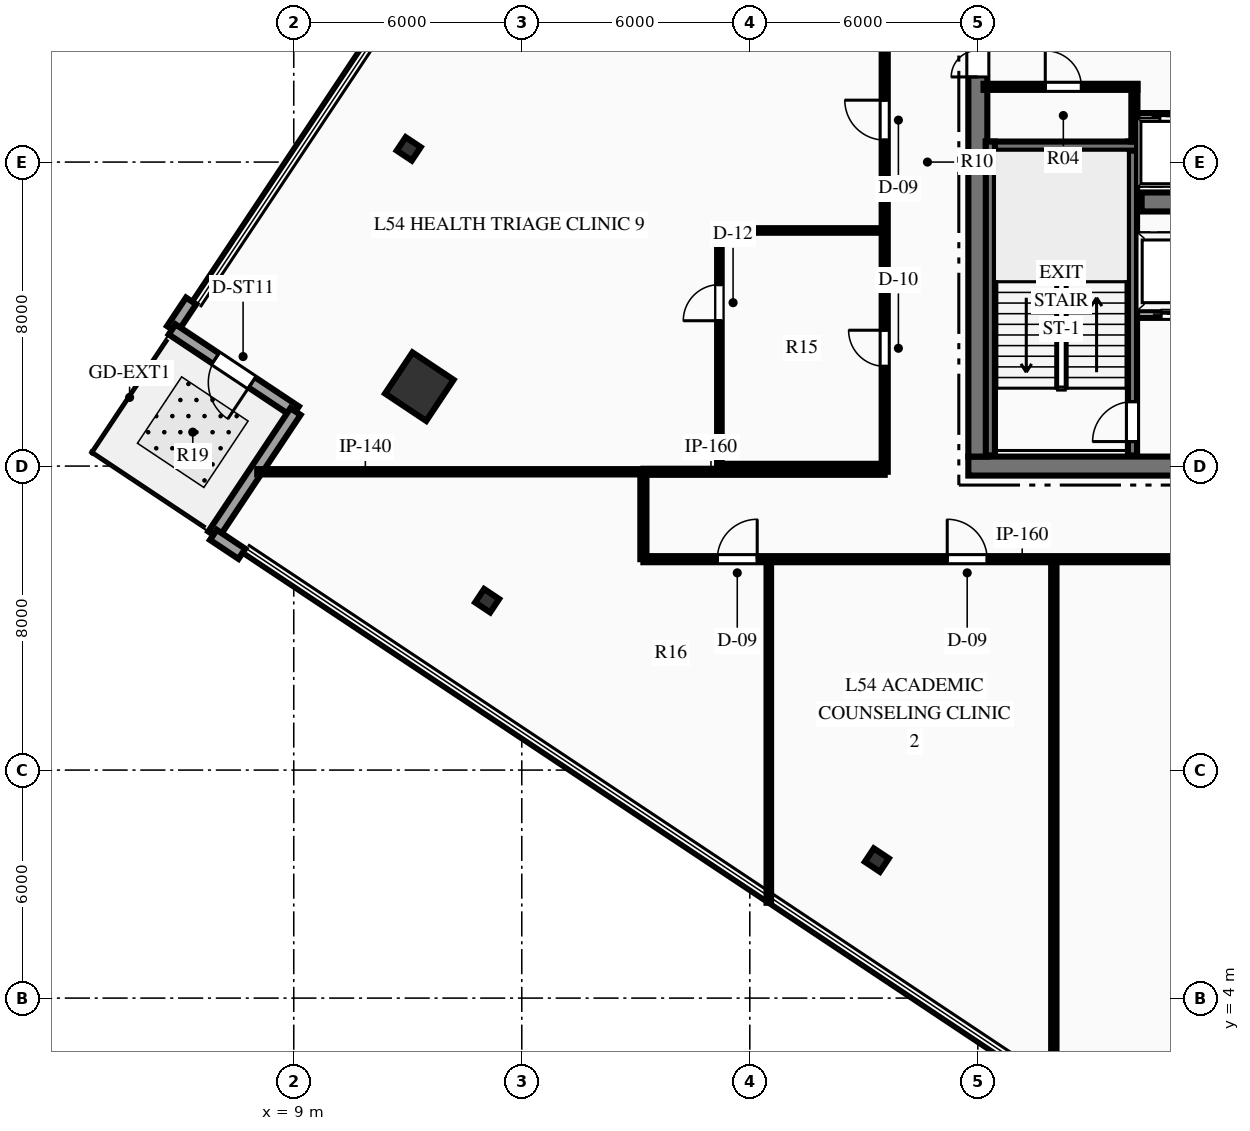
"""IFC4 building model, lengths in metres.
Left out: names, types, materials, properties, quantities, classifications, styles, units other than length and angle.
Written with IfcOpenShell. Run it as: python <this file> out.ifc"""

import sys

from ifc_helpers import new_model, si_unit, direction, frame, frame_2d, origin, origin_2d, place, context, subcontext, project, spatial, rectangle, hollow_rectangle, i_section, extrude, element, fill, save


model = new_model("IFC4")
c1 = context("Model", 3, precision=1e-05, world=origin(), true_north=direction((0.0, 1.0)))
c2 = subcontext(c1, "Body", "Model", "MODEL_VIEW")
j1 = project(units=[si_unit("LENGTHUNIT", "METRE"), si_unit("PLANEANGLEUNIT", "RADIAN")], contexts=[c1])
p1 = place(None, origin())
s1 = spatial("IfcSite", under=j1, at=p1, CompositionType="ELEMENT")
p2 = place(p1, origin())
s2 = spatial("IfcBuilding", under=s1, at=p2, CompositionType="ELEMENT")
p3 = place(p2, frame((0.0, 0.0, 217.2)))
s3 = spatial("IfcBuildingStorey", under=s2, at=p3, CompositionType="ELEMENT", Elevation=217.2)
p4 = place(p3, frame((26.75, 18.0, 0.0), z_axis=(0.0, 0.0, 1.0), x_axis=(1.0, 0.0, 0.0)))
e1 = element("IfcWall", 1, at=p4, inside=s3, PredefinedType="SHEAR", context=c2, shape_type="SweptSolid", body=[
    extrude(rectangle(XDim=18.5, YDim=0.5, at=frame_2d((9.25, 0.0))), origin(), (0.0, 0.0, 1.0), 3.75),
])
p5 = place(p4, frame((7.35, 0.0, 0.0)))
e2 = element("IfcOpeningElement", 2, at=p5, cuts=e1, PredefinedType="OPENING", context=c2, shape_type="SweptSolid", body=[
    extrude(rectangle(XDim=1.1, YDim=2.15, at=frame_2d((0.55, 1.075))), frame((0.0, 0.26, 0.0), z_axis=(0.0, -1.0, 0.0), x_axis=(1.0, 0.0, 0.0)), (0.0, 0.0, 1.0), 0.52),
])
p6 = place(p4, frame((10.05, 0.0, 0.0)))
e3 = element("IfcOpeningElement", 3, at=p6, cuts=e1, PredefinedType="OPENING", context=c2, shape_type="SweptSolid", body=[
    extrude(rectangle(XDim=1.1, YDim=2.15, at=frame_2d((0.55, 1.075))), frame((0.0, 0.26, 0.0), z_axis=(0.0, -1.0, 0.0), x_axis=(1.0, 0.0, 0.0)), (0.0, 0.0, 1.0), 0.52),
])
p7 = place(p3, frame((27.0, 18.25, 0.0), z_axis=(0.0, 0.0, 1.0), x_axis=(0.0, 1.0, 0.0)))
e4 = element("IfcWall", 4, at=p7, inside=s3, PredefinedType="SHEAR", context=c2, shape_type="SweptSolid", body=[
    extrude(rectangle(XDim=15.5, YDim=0.5, at=frame_2d((7.75, 0.0))), origin(), (0.0, 0.0, 1.0), 3.75),
])
p8 = place(p7, frame((9.99, 0.0, 0.0)))
e5 = element("IfcOpeningElement", 5, at=p8, cuts=e4, PredefinedType="OPENING", context=c2, shape_type="SweptSolid", body=[
    extrude(rectangle(XDim=1.4, YDim=2.2, at=frame_2d((0.7, 1.1))), frame((0.0, 0.26, 0.0), z_axis=(0.0, -1.0, 0.0), x_axis=(1.0, 0.0, 0.0)), (0.0, 0.0, 1.0), 0.52),
])
p9 = place(p3, frame((31.31, 24.95, 0.0), z_axis=(0.0, 0.0, 1.0), x_axis=(1.0, 0.0, 0.0)))
e6 = element("IfcWall", 6, at=p9, inside=s3, PredefinedType="SHEAR", context=c2, shape_type="SweptSolid", body=[
    extrude(rectangle(XDim=9.38, YDim=0.5, at=frame_2d((4.69, 0.0))), origin(), (0.0, 0.0, 1.0), 3.75),
])
p10 = place(p3, frame((31.07, 18.28, 0.0), z_axis=(0.0, 0.0, 1.0), x_axis=(0.0, 1.0, 0.0)))
e7 = element("IfcWall", 7, at=p10, inside=s3, PredefinedType="SHEAR", context=c2, shape_type="SweptSolid", body=[
    extrude(rectangle(XDim=8.26, YDim=0.24, at=frame_2d((4.13, 0.0))), origin(), (0.0, 0.0, 1.0), 3.75),
])
p11 = place(p10, frame((0.365, 0.0, 0.0)))
e8 = element("IfcOpeningElement", 8, at=p11, cuts=e7, PredefinedType="OPENING", context=c2, shape_type="SweptSolid", body=[
    extrude(rectangle(XDim=1.05, YDim=2.15, at=frame_2d((0.525, 1.075))), frame((0.0, 0.13, 0.0), z_axis=(0.0, -1.0, 0.0), x_axis=(1.0, 0.0, 0.0)), (0.0, 0.0, 1.0), 0.26),
])
p12 = place(p3, frame((27.21, 26.42, 0.0), z_axis=(0.0, 0.0, 1.0), x_axis=(1.0, 0.0, 0.0)))
e9 = element("IfcWall", 9, at=p12, inside=s3, PredefinedType="SHEAR", context=c2, shape_type="SweptSolid", body=[
    extrude(rectangle(XDim=3.98, YDim=0.24, at=frame_2d((1.99, 0.0))), origin(), (0.0, 0.0, 1.0), 3.75),
])
p13 = place(p3, frame((27.33, 18.28, 0.0), z_axis=(0.0, 0.0, 1.0), x_axis=(0.0, 1.0, 0.0)))
e10 = element("IfcWall", 10, at=p13, inside=s3, PredefinedType="SHEAR", context=c2, shape_type="SweptSolid", body=[
    extrude(rectangle(XDim=8.26, YDim=0.24, at=frame_2d((4.13, 0.0))), origin(), (0.0, 0.0, 1.0), 3.75),
])
p14 = place(p3, frame((12.305, 20.09, 0.0), z_axis=(0.0, 0.0, 1.0), x_axis=(0.554118199338, 0.832437998389, 0.0)))
e11 = element("IfcColumn", 11, at=p14, inside=s3, PredefinedType="COLUMN", context=c2, shape_type="SweptSolid", body=[
    extrude(hollow_rectangle(XDim=1.3, YDim=1.3, WallThickness=0.06, at=origin_2d()), origin(), (0.0, 0.0, 1.0), 3.75),
])
for number, where, z_axis, x_axis in (
    (12, (12.025, 26.347, 0.0), (0.0, 0.0, 1.0), (0.554, 0.832, 0.0)),
    (13, (14.088, 14.458, 0.0), (0.0, 0.0, 1.0), (0.554, 0.832, 0.0)),
    (14, (24.343, 7.631, 0.0), (0.0, 0.0, 1.0), (0.554, 0.832, 0.0)),
):
    element("IfcColumn", number, at=place(p3, frame(where, z_axis=z_axis, x_axis=x_axis)), inside=s3, PredefinedType="COLUMN", context=c2, shape_type="SweptSolid", body=[
        extrude(i_section(OverallWidth=0.424, OverallDepth=0.474, WebThickness=0.048, FlangeThickness=0.077, at=origin_2d()), origin(), (0.0, 0.0, 1.0), 3.75),
    ])
p15 = place(p3, frame((5.8, 21.597, 0.0), z_axis=(0.0, 0.0, 1.0), x_axis=(0.554136731172, 0.832425662246, 0.0)))
e15 = element("IfcWall", 15, at=p15, inside=s3, PredefinedType="STANDARD", context=c2, shape_type="SweptSolid", body=[
    extrude(rectangle(XDim=0.9, YDim=0.32, at=frame_2d((0.45, 0.0))), origin(), (0.0, 0.0, 1.0), 3.47),
])
p16 = place(p3, frame((9.046, 19.436, 0.0), z_axis=(0.0, 0.0, 1.0), x_axis=(-0.832464190202, 0.554078850013, 0.0)))
e16 = element("IfcWall", 16, at=p16, inside=s3, PredefinedType="STANDARD", context=c2, shape_type="SweptSolid", body=[
    extrude(rectangle(XDim=3.9, YDim=0.32, at=frame_2d((1.95, 0.0))), origin(), (0.0, 0.0, 1.0), 3.47),
])
p17 = place(p16, frame((1.375, 0.0, 0.0)))
e17 = element("IfcOpeningElement", 17, at=p17, cuts=e16, PredefinedType="OPENING", context=c2, shape_type="SweptSolid", body=[
    extrude(rectangle(XDim=1.15, YDim=2.2, at=frame_2d((0.575, 1.1))), frame((0.0, 0.17, 0.0), z_axis=(0.0, -1.0, 0.0), x_axis=(1.0, 0.0, 0.0)), (0.0, 0.0, 1.0), 0.34),
])
p18 = place(p3, frame((6.885, 16.189, 0.0), z_axis=(0.0, 0.0, 1.0), x_axis=(0.554122229834, 0.832435315447, 0.0)))
e18 = element("IfcWall", 18, at=p18, inside=s3, PredefinedType="STANDARD", context=c2, shape_type="SweptSolid", body=[
    extrude(rectangle(XDim=3.9, YDim=0.32, at=frame_2d((1.95, 0.0))), origin(), (0.0, 0.0, 1.0), 3.47),
])
p19 = place(p3, frame((7.634, 15.69, 0.0), z_axis=(0.0, 0.0, 1.0), x_axis=(-0.832425662246, 0.554136731172, 0.0)))
e19 = element("IfcWall", 19, at=p19, inside=s3, PredefinedType="STANDARD", context=c2, shape_type="SweptSolid", body=[
    extrude(rectangle(XDim=0.9, YDim=0.32, at=frame_2d((0.45, 0.0))), origin(), (0.0, 0.0, 1.0), 3.47),
])
p20 = place(p3, frame((31.19, 22.0, 0.0), z_axis=(0.0, 0.0, 1.0), x_axis=(1.0, 0.0, 0.0)))
e20 = element("IfcWall", 20, at=p20, inside=s3, PredefinedType="PARTITIONING", context=c2, shape_type="SweptSolid", body=[
    extrude(rectangle(XDim=4.69, YDim=0.2, at=frame_2d((2.345, 0.0))), origin(), (0.0, 0.0, 1.0), 3.47),
])
p21 = place(p20, frame((2.91, 0.0, 0.0)))
e21 = element("IfcOpeningElement", 21, at=p21, cuts=e20, PredefinedType="OPENING", context=c2, shape_type="SweptSolid", body=[
    extrude(rectangle(XDim=0.9, YDim=2.15, at=frame_2d((0.45, 1.075))), frame((0.0, 0.11, 0.0), z_axis=(0.0, -1.0, 0.0), x_axis=(1.0, 0.0, 0.0)), (0.0, 0.0, 1.0), 0.22),
])
p22 = place(p20, frame((0.635, 0.0, 0.0)))
e22 = element("IfcOpeningElement", 22, at=p22, cuts=e20, PredefinedType="OPENING", context=c2, shape_type="SweptSolid", body=[
    extrude(rectangle(XDim=1.1, YDim=2.15, at=frame_2d((0.55, 1.075))), frame((0.0, 0.11, 0.0), z_axis=(0.0, -1.0, 0.0), x_axis=(1.0, 0.0, 0.0)), (0.0, 0.0, 1.0), 0.22),
])
p23 = place(p3, frame((27.15, 27.98, 0.0), z_axis=(0.0, 0.0, 1.0), x_axis=(1.0, 0.0, 0.0)))
e23 = element("IfcWall", 23, at=p23, inside=s3, PredefinedType="PARTITIONING", context=c2, shape_type="SweptSolid", body=[
    extrude(rectangle(XDim=4.05, YDim=0.16, at=frame_2d((2.025, 0.0))), origin(), (0.0, 0.0, 1.0), 3.47),
])
p24 = place(p23, frame((1.625, 0.0, 0.0)))
e24 = element("IfcOpeningElement", 24, at=p24, cuts=e23, PredefinedType="OPENING", context=c2, shape_type="SweptSolid", body=[
    extrude(rectangle(XDim=0.95, YDim=2.15, at=frame_2d((0.475, 1.075))), frame((0.0, 0.09, 0.0), z_axis=(0.0, -1.0, 0.0), x_axis=(1.0, 0.0, 0.0)), (0.0, 0.0, 1.0), 0.18),
])
p25 = place(p3, frame((31.12, 26.54, 0.0), z_axis=(0.0, 0.0, 1.0), x_axis=(0.0, 1.0, 0.0)))
e25 = element("IfcWall", 25, at=p25, inside=s3, PredefinedType="PARTITIONING", context=c2, shape_type="SweptSolid", body=[
    extrude(rectangle(XDim=1.51, YDim=0.16, at=frame_2d((0.755, 0.0))), origin(), (0.0, 0.0, 1.0), 3.47),
])
p26 = place(p3, frame((31.2, 27.2, 0.0), z_axis=(0.0, 0.0, 1.0), x_axis=(1.0, 0.0, 0.0)))
e26 = element("IfcWall", 26, at=p26, inside=s3, PredefinedType="PARTITIONING", context=c2, shape_type="SweptSolid", body=[
    extrude(rectangle(XDim=9.6, YDim=0.18, at=frame_2d((4.8, 0.0))), origin(), (0.0, 0.0, 1.0), 3.47),
])
p27 = place(p26, frame((0.59, 0.0, 0.0)))
e27 = element("IfcOpeningElement", 27, at=p27, cuts=e26, PredefinedType="OPENING", context=c2, shape_type="SweptSolid", body=[
    extrude(rectangle(XDim=1.1, YDim=2.15, at=frame_2d((0.55, 1.075))), frame((0.0, 0.1, 0.0), z_axis=(0.0, -1.0, 0.0), x_axis=(1.0, 0.0, 0.0)), (0.0, 0.0, 1.0), 0.2),
])
p28 = place(p26, frame((2.99, 0.0, 0.0)))
e28 = element("IfcOpeningElement", 28, at=p28, cuts=e26, PredefinedType="OPENING", context=c2, shape_type="SweptSolid", body=[
    extrude(rectangle(XDim=1.1, YDim=2.15, at=frame_2d((0.55, 1.075))), frame((0.0, 0.1, 0.0), z_axis=(0.0, -1.0, 0.0), x_axis=(1.0, 0.0, 0.0)), (0.0, 0.0, 1.0), 0.2),
])
p29 = place(p26, frame((5.51, 0.0, 0.0)))
e29 = element("IfcOpeningElement", 29, at=p29, cuts=e26, PredefinedType="OPENING", context=c2, shape_type="SweptSolid", body=[
    extrude(rectangle(XDim=1.1, YDim=2.15, at=frame_2d((0.55, 1.075))), frame((0.0, 0.1, 0.0), z_axis=(0.0, -1.0, 0.0), x_axis=(1.0, 0.0, 0.0)), (0.0, 0.0, 1.0), 0.2),
])
p30 = place(p26, frame((7.91, 0.0, 0.0)))
e30 = element("IfcOpeningElement", 30, at=p30, cuts=e26, PredefinedType="OPENING", context=c2, shape_type="SweptSolid", body=[
    extrude(rectangle(XDim=1.1, YDim=2.15, at=frame_2d((0.55, 1.075))), frame((0.0, 0.1, 0.0), z_axis=(0.0, -1.0, 0.0), x_axis=(1.0, 0.0, 0.0)), (0.0, 0.0, 1.0), 0.2),
])
p31 = place(p3, frame((18.2, 15.55, 0.0), z_axis=(0.0, 0.0, 1.0), x_axis=(1.0, 0.0, 0.0)))
e31 = element("IfcWall", 31, at=p31, inside=s3, PredefinedType="PARTITIONING", context=c2, shape_type="SweptSolid", body=[
    extrude(rectangle(XDim=35.6, YDim=0.16, at=frame_2d((17.8, 0.0))), origin(), (0.0, 0.0, 1.0), 2.849),
])
p32 = place(p31, frame((22.45, 0.0, 0.0)))
e32 = element("IfcOpeningElement", 32, at=p32, cuts=e31, PredefinedType="OPENING", context=c2, shape_type="SweptSolid", body=[
    extrude(rectangle(XDim=0.9, YDim=2.15, at=frame_2d((0.45, 1.075))), frame((0.0, 0.09, 0.0), z_axis=(0.0, -1.0, 0.0), x_axis=(1.0, 0.0, 0.0)), (0.0, 0.0, 1.0), 0.18),
])
p33 = place(p31, frame((24.75, 0.0, 0.0)))
e33 = element("IfcOpeningElement", 33, at=p33, cuts=e31, PredefinedType="OPENING", context=c2, shape_type="SweptSolid", body=[
    extrude(rectangle(XDim=0.9, YDim=2.15, at=frame_2d((0.45, 1.075))), frame((0.0, 0.09, 0.0), z_axis=(0.0, -1.0, 0.0), x_axis=(1.0, 0.0, 0.0)), (0.0, 0.0, 1.0), 0.18),
])
p34 = place(p31, frame((27.0, 0.0, 0.0)))
e34 = element("IfcOpeningElement", 34, at=p34, cuts=e31, PredefinedType="OPENING", context=c2, shape_type="SweptSolid", body=[
    extrude(rectangle(XDim=1.0, YDim=2.15, at=frame_2d((0.5, 1.075))), frame((0.0, 0.09, 0.0), z_axis=(0.0, -1.0, 0.0), x_axis=(1.0, 0.0, 0.0)), (0.0, 0.0, 1.0), 0.18),
])
p35 = place(p31, frame((1.945, 0.0, 0.0)))
e35 = element("IfcOpeningElement", 35, at=p35, cuts=e31, PredefinedType="OPENING", context=c2, shape_type="SweptSolid", body=[
    extrude(rectangle(XDim=1.05, YDim=2.15, at=frame_2d((0.525, 1.075))), frame((0.0, 0.09, 0.0), z_axis=(0.0, -1.0, 0.0), x_axis=(1.0, 0.0, 0.0)), (0.0, 0.0, 1.0), 0.18),
])
p36 = place(p31, frame((7.995, 0.0, 0.0)))
e36 = element("IfcOpeningElement", 36, at=p36, cuts=e31, PredefinedType="OPENING", context=c2, shape_type="SweptSolid", body=[
    extrude(rectangle(XDim=1.05, YDim=2.15, at=frame_2d((0.525, 1.075))), frame((0.0, 0.09, 0.0), z_axis=(0.0, -1.0, 0.0), x_axis=(1.0, 0.0, 0.0)), (0.0, 0.0, 1.0), 0.18),
])
p37 = place(p31, frame((17.827, 0.0, 0.0)))
e37 = element("IfcOpeningElement", 37, at=p37, cuts=e31, PredefinedType="OPENING", context=c2, shape_type="SweptSolid", body=[
    extrude(rectangle(XDim=1.05, YDim=2.15, at=frame_2d((0.525, 1.075))), frame((0.0, 0.09, 0.0), z_axis=(0.0, -1.0, 0.0), x_axis=(1.0, 0.0, 0.0)), (0.0, 0.0, 1.0), 0.18),
])
p38 = place(p3, frame((18.2, 17.85, 0.0), z_axis=(0.0, 0.0, 1.0), x_axis=(1.0, 0.0, 0.0)))
e38 = element("IfcWall", 38, at=p38, inside=s3, PredefinedType="PARTITIONING", context=c2, shape_type="SweptSolid", body=[
    extrude(rectangle(XDim=6.35, YDim=0.16, at=frame_2d((3.175, 0.0))), origin(), (0.0, 0.0, 1.0), 3.47),
])
p39 = place(p3, frame((24.55, 17.85, 0.0), z_axis=(0.0, 0.0, 1.0), x_axis=(0.0, 1.0, 0.0)))
e39 = element("IfcWall", 39, at=p39, inside=s3, PredefinedType="PARTITIONING", context=c2, shape_type="SweptSolid", body=[
    extrude(rectangle(XDim=16.3, YDim=0.16, at=frame_2d((8.15, 0.0))), origin(), (0.0, 0.0, 1.0), 3.47),
])
p40 = place(p39, frame((2.775, 0.0, 0.0)))
e40 = element("IfcOpeningElement", 40, at=p40, cuts=e39, PredefinedType="OPENING", context=c2, shape_type="SweptSolid", body=[
    extrude(rectangle(XDim=0.95, YDim=2.15, at=frame_2d((0.475, 1.075))), frame((0.0, 0.09, 0.0), z_axis=(0.0, -1.0, 0.0), x_axis=(1.0, 0.0, 0.0)), (0.0, 0.0, 1.0), 0.18),
])
p41 = place(p39, frame((8.729, 0.0, 0.0)))
e41 = element("IfcOpeningElement", 41, at=p41, cuts=e39, PredefinedType="OPENING", context=c2, shape_type="SweptSolid", body=[
    extrude(rectangle(XDim=1.05, YDim=2.15, at=frame_2d((0.525, 1.075))), frame((0.0, 0.09, 0.0), z_axis=(0.0, -1.0, 0.0), x_axis=(1.0, 0.0, 0.0)), (0.0, 0.0, 1.0), 0.18),
])
p42 = place(p3, frame((18.2, 15.55, 0.0), z_axis=(0.0, 0.0, 1.0), x_axis=(0.0, 1.0, 0.0)))
e42 = element("IfcWall", 42, at=p42, inside=s3, PredefinedType="PARTITIONING", context=c2, shape_type="SweptSolid", body=[
    extrude(rectangle(XDim=2.3, YDim=0.16, at=frame_2d((1.15, 0.0))), origin(), (0.0, 0.0, 1.0), 3.47),
])
p43 = place(p3, frame((8.039, 17.85, 0.0), z_axis=(0.0, 0.0, 1.0), x_axis=(1.0, 0.0, 0.0)))
e43 = element("IfcWall", 43, at=p43, inside=s3, PredefinedType="PARTITIONING", context=c2, shape_type="SweptSolid", body=[
    extrude(rectangle(XDim=10.161, YDim=0.14, at=frame_2d((5.081, 0.0))), origin(), (0.0, 0.0, 1.0), 3.47),
])
p44 = place(p3, frame((21.5, 6.509, 0.0), z_axis=(0.0, 0.0, 1.0), x_axis=(0.0, 1.0, 0.0)))
e44 = element("IfcWall", 44, at=p44, inside=s3, PredefinedType="PARTITIONING", context=c2, shape_type="SweptSolid", body=[
    extrude(rectangle(XDim=9.041, YDim=0.12, at=frame_2d((4.521, 0.0))), origin(), (0.0, 0.0, 1.0), 3.47),
])
p45 = place(p3, frame((29.0, 1.516, 0.0), z_axis=(0.0, 0.0, 1.0), x_axis=(0.0, 1.0, 0.0)))
e45 = element("IfcWall", 45, at=p45, inside=s3, PredefinedType="PARTITIONING", context=c2, shape_type="SweptSolid", body=[
    extrude(rectangle(XDim=14.034, YDim=0.14, at=frame_2d((7.017, 0.0))), origin(), (0.0, 0.0, 1.0), 3.47),
])
p46 = place(p3, frame((20.2, 18.0, 0.0), z_axis=(0.0, 0.0, 1.0), x_axis=(1.0, 0.0, 0.0)))
e46 = element("IfcWall", 46, at=p46, inside=s3, PredefinedType="PARTITIONING", context=c2, shape_type="SweptSolid", body=[
    extrude(rectangle(XDim=4.35, YDim=0.12, at=frame_2d((2.175, 0.0))), origin(), (0.0, 0.0, 1.0), 3.47),
])
p47 = place(p3, frame((20.2, 18.0, 0.0), z_axis=(0.0, 0.0, 1.0), x_axis=(0.0, 1.0, 0.0)))
e47 = element("IfcWall", 47, at=p47, inside=s3, PredefinedType="PARTITIONING", context=c2, shape_type="SweptSolid", body=[
    extrude(rectangle(XDim=6.2, YDim=0.12, at=frame_2d((3.1, 0.0))), origin(), (0.0, 0.0, 1.0), 3.47),
])
p48 = place(p47, frame((3.825, 0.0, 0.0)))
e48 = element("IfcOpeningElement", 48, at=p48, cuts=e47, PredefinedType="OPENING", context=c2, shape_type="SweptSolid", body=[
    extrude(rectangle(XDim=0.95, YDim=2.15, at=frame_2d((0.475, 1.075))), frame((0.0, 0.07, 0.0), z_axis=(0.0, -1.0, 0.0), x_axis=(1.0, 0.0, 0.0)), (0.0, 0.0, 1.0), 0.14),
])
p49 = place(p3, frame((20.2, 24.2, 0.0), z_axis=(0.0, 0.0, 1.0), x_axis=(1.0, 0.0, 0.0)))
e49 = element("IfcWall", 49, at=p49, inside=s3, PredefinedType="PARTITIONING", context=c2, shape_type="SweptSolid", body=[
    extrude(rectangle(XDim=4.35, YDim=0.12, at=frame_2d((2.175, 0.0))), origin(), (0.0, 0.0, 1.0), 3.47),
])
p50 = place(p17, origin())
e50 = element("IfcDoor", 50, at=p50, inside=s3, OperationType="SINGLE_SWING_LEFT", PredefinedType="DOOR", context=c2, shape_type="SweptSolid", body=[
    extrude(rectangle(XDim=1.15, YDim=2.2, at=frame_2d((0.575, 1.1))), frame((0.0, 0.025, 0.0), z_axis=(0.0, -1.0, 0.0), x_axis=(1.0, 0.0, 0.0)), (0.0, 0.0, 1.0), 0.05),
])
fill(e17, e50)
p51 = place(p24, origin())
e51 = element("IfcDoor", 51, at=p51, inside=s3, OperationType="SINGLE_SWING_LEFT", PredefinedType="DOOR", context=c2, shape_type="SweptSolid", body=[
    extrude(rectangle(XDim=0.95, YDim=2.15, at=frame_2d((0.475, 1.075))), frame((0.0, 0.025, 0.0), z_axis=(0.0, -1.0, 0.0), x_axis=(1.0, 0.0, 0.0)), (0.0, 0.0, 1.0), 0.05),
])
fill(e24, e51)
p52 = place(p11, origin())
e52 = element("IfcDoor", 52, at=p52, inside=s3, OperationType="SINGLE_SWING_LEFT", PredefinedType="DOOR", context=c2, shape_type="SweptSolid", body=[
    extrude(rectangle(XDim=1.05, YDim=2.15, at=frame_2d((0.525, 1.075))), frame((0.0, 0.025, 0.0), z_axis=(0.0, -1.0, 0.0), x_axis=(1.0, 0.0, 0.0)), (0.0, 0.0, 1.0), 0.05),
])
fill(e8, e52)
p53 = place(p8, origin())
e53 = element("IfcDoor", 53, at=p53, inside=s3, OperationType="DOUBLE_DOOR_SINGLE_SWING", PredefinedType="DOOR", context=c2, shape_type="SweptSolid", body=[
    extrude(rectangle(XDim=1.4, YDim=2.2, at=frame_2d((0.7, 1.1))), frame((0.0, 0.025, 0.0), z_axis=(0.0, -1.0, 0.0), x_axis=(1.0, 0.0, 0.0)), (0.0, 0.0, 1.0), 0.05),
])
fill(e5, e53)
p54 = place(p40, origin())
e54 = element("IfcDoor", 54, at=p54, inside=s3, OperationType="SINGLE_SWING_RIGHT", PredefinedType="DOOR", context=c2, shape_type="SweptSolid", body=[
    extrude(rectangle(XDim=0.95, YDim=2.15, at=frame_2d((0.475, 1.075))), frame((0.0, 0.025, 0.0), z_axis=(0.0, -1.0, 0.0), x_axis=(1.0, 0.0, 0.0)), (0.0, 0.0, 1.0), 0.05),
])
fill(e40, e54)
p55 = place(p48, origin())
e55 = element("IfcDoor", 55, at=p55, inside=s3, OperationType="SINGLE_SWING_LEFT", PredefinedType="DOOR", context=c2, shape_type="SweptSolid", body=[
    extrude(rectangle(XDim=0.95, YDim=2.15, at=frame_2d((0.475, 1.075))), frame((0.0, 0.025, 0.0), z_axis=(0.0, -1.0, 0.0), x_axis=(1.0, 0.0, 0.0)), (0.0, 0.0, 1.0), 0.05),
])
fill(e48, e55)
p56 = place(p35, origin())
e56 = element("IfcDoor", 56, at=p56, inside=s3, OperationType="SINGLE_SWING_RIGHT", PredefinedType="DOOR", context=c2, shape_type="SweptSolid", body=[
    extrude(rectangle(XDim=1.05, YDim=2.15, at=frame_2d((0.525, 1.075))), frame((0.0, 0.025, 0.0), z_axis=(0.0, -1.0, 0.0), x_axis=(1.0, 0.0, 0.0)), (0.0, 0.0, 1.0), 0.05),
])
fill(e35, e56)
p57 = place(p36, origin())
e57 = element("IfcDoor", 57, at=p57, inside=s3, OperationType="SINGLE_SWING_LEFT", PredefinedType="DOOR", context=c2, shape_type="SweptSolid", body=[
    extrude(rectangle(XDim=1.05, YDim=2.15, at=frame_2d((0.525, 1.075))), frame((0.0, 0.025, 0.0), z_axis=(0.0, -1.0, 0.0), x_axis=(1.0, 0.0, 0.0)), (0.0, 0.0, 1.0), 0.05),
])
fill(e36, e57)
p58 = place(p41, origin())
e58 = element("IfcDoor", 58, at=p58, inside=s3, OperationType="SINGLE_SWING_RIGHT", PredefinedType="DOOR", context=c2, shape_type="SweptSolid", body=[
    extrude(rectangle(XDim=1.05, YDim=2.15, at=frame_2d((0.525, 1.075))), frame((0.0, 0.025, 0.0), z_axis=(0.0, -1.0, 0.0), x_axis=(1.0, 0.0, 0.0)), (0.0, 0.0, 1.0), 0.05),
])
fill(e41, e58)
p59 = place(p27, origin())
e59 = element("IfcDoor", 59, at=p59, inside=s3, OperationType="SLIDING_TO_LEFT", PredefinedType="DOOR", context=c2, shape_type="SweptSolid", body=[
    extrude(rectangle(XDim=1.1, YDim=2.15, at=frame_2d((0.55, 1.075))), frame((0.0, 0.025, 0.0), z_axis=(0.0, -1.0, 0.0), x_axis=(1.0, 0.0, 0.0)), (0.0, 0.0, 1.0), 0.05),
])
fill(e27, e59)
p60 = place(p22, origin())
e60 = element("IfcDoor", 60, at=p60, inside=s3, OperationType="SLIDING_TO_LEFT", PredefinedType="DOOR", context=c2, shape_type="SweptSolid", body=[
    extrude(rectangle(XDim=1.1, YDim=2.15, at=frame_2d((0.55, 1.075))), frame((0.0, 0.025, 0.0), z_axis=(0.0, -1.0, 0.0), x_axis=(1.0, 0.0, 0.0)), (0.0, 0.0, 1.0), 0.05),
])
fill(e22, e60)
save(model, sys.argv[1])
